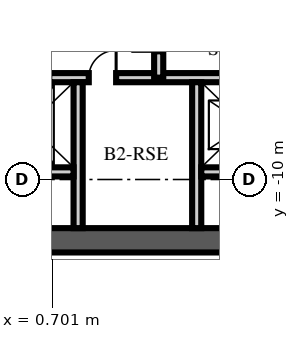
"""IFC4 building model, lengths in metres.
Left out: names, types, materials, properties, quantities, classifications, styles, units other than length and angle.
Written with IfcOpenShell. Run it as: python <this file> out.ifc"""

import sys

from ifc_helpers import new_model, si_unit, direction, frame, frame_2d, origin, place, context, subcontext, project, spatial, rectangle, extrude, element, fill, save


model = new_model("IFC4")
c1 = context("Model", 3, precision=1e-05, world=origin(), true_north=direction((0.0, 1.0)))
c2 = subcontext(c1, "Body", "Model", "MODEL_VIEW")
j1 = project(units=[si_unit("LENGTHUNIT", "METRE"), si_unit("PLANEANGLEUNIT", "RADIAN")], contexts=[c1])
p1 = place(None, origin())
s1 = spatial("IfcSite", under=j1, at=p1, CompositionType="ELEMENT")
p2 = place(p1, origin())
s2 = spatial("IfcBuilding", under=s1, at=p2, CompositionType="ELEMENT")
p3 = place(p2, frame((0.0, 0.0, -9.0)))
s3 = spatial("IfcBuildingStorey", under=s2, at=p3, CompositionType="ELEMENT", Elevation=-9.0)
p4 = place(p3, frame((-15.5, -12.0, -0.3), z_axis=(0.0, 0.0, 1.0), x_axis=(1.0, 0.0, 0.0)))
e1 = element("IfcWall", 1, at=p4, inside=s3, PredefinedType="SHEAR", context=c2, shape_type="SweptSolid", body=[
    extrude(rectangle(XDim=31.0, YDim=0.8, at=frame_2d((15.5, 0.0))), origin(), (0.0, 0.0, 1.0), 3.6),
])
p5 = place(p3, frame((-8.5, -6.65, 0.0), z_axis=(0.0, 0.0, 1.0), x_axis=(1.0, 0.0, 0.0)))
e2 = element("IfcWall", 2, at=p5, inside=s3, PredefinedType="PARTITIONING", context=c2, shape_type="SweptSolid", body=[
    extrude(rectangle(XDim=17.0, YDim=0.3, at=frame_2d((8.5, 0.0))), origin(), (0.0, 0.0, 1.0), 3.3),
])
p6 = place(p5, frame((7.8, 0.0, 0.0)))
e3 = element("IfcOpeningElement", 3, at=p6, cuts=e2, PredefinedType="OPENING", context=c2, shape_type="SweptSolid", body=[
    extrude(rectangle(XDim=1.3, YDim=2.4, at=frame_2d((0.65, 1.2))), frame((0.0, 0.16, 0.0), z_axis=(0.0, -1.0, 0.0), x_axis=(1.0, 0.0, 0.0)), (0.0, 0.0, 1.0), 0.32),
])
p7 = place(p5, frame((5.65, 0.0, 0.0)))
e4 = element("IfcOpeningElement", 4, at=p7, cuts=e2, PredefinedType="OPENING", context=c2, shape_type="SweptSolid", body=[
    extrude(rectangle(XDim=0.9, YDim=2.1, at=frame_2d((0.45, 1.05))), frame((0.0, 0.16, 0.0), z_axis=(0.0, -1.0, 0.0), x_axis=(1.0, 0.0, 0.0)), (0.0, 0.0, 1.0), 0.32),
])
p8 = place(p5, frame((10.4, 0.0, 0.0)))
e5 = element("IfcOpeningElement", 5, at=p8, cuts=e2, PredefinedType="OPENING", context=c2, shape_type="SweptSolid", body=[
    extrude(rectangle(XDim=0.9, YDim=2.1, at=frame_2d((0.45, 1.05))), frame((0.0, 0.16, 0.0), z_axis=(0.0, -1.0, 0.0), x_axis=(1.0, 0.0, 0.0)), (0.0, 0.0, 1.0), 0.32),
])
for number, where, z_axis, x_axis in (
    (6, (1.55, -11.6, 0.0), (0.0, 0.0, 1.0), (0.0, 1.0, 0.0)),
    (7, (5.45, -11.6, 0.0), (0.0, 0.0, 1.0), (0.0, 1.0, 0.0)),
):
    element("IfcWall", number, at=place(p3, frame(where, z_axis=z_axis, x_axis=x_axis)), inside=s3, PredefinedType="PARTITIONING", context=c2, shape_type="SweptSolid", body=[
        extrude(rectangle(XDim=4.8, YDim=0.3, at=frame_2d((2.4, 0.0))), origin(), (0.0, 0.0, 1.0), 3.3),
    ])
for number, where, z_axis, x_axis in (
    (8, (-1.5, -9.75, 0.0), (0.0, 0.0, 1.0), (1.0, 0.0, 0.0)),
    (9, (5.6, -9.75, 0.0), (0.0, 0.0, 1.0), (1.0, 0.0, 0.0)),
):
    element("IfcWall", number, at=place(p3, frame(where, z_axis=z_axis, x_axis=x_axis)), inside=s3, PredefinedType="PARTITIONING", context=c2, shape_type="SweptSolid", body=[
        extrude(rectangle(XDim=2.9, YDim=0.3, at=frame_2d((1.45, 0.0))), origin(), (0.0, 0.0, 1.0), 3.3),
    ])
p9 = place(p3, frame((4.2, -6.65, 0.0), z_axis=(0.0, 0.0, 1.0), x_axis=(0.0, 1.0, 0.0)))
e10 = element("IfcWall", 10, at=p9, inside=s3, PredefinedType="PARTITIONING", context=c2, shape_type="SweptSolid", body=[
    extrude(rectangle(XDim=7.45, YDim=0.3, at=frame_2d((3.725, 0.0))), origin(), (0.0, 0.0, 1.0), 3.3),
])
p10 = place(p9, frame((0.866, 0.0, 0.0)))
e11 = element("IfcOpeningElement", 11, at=p10, cuts=e10, PredefinedType="OPENING", context=c2, shape_type="SweptSolid", body=[
    extrude(rectangle(XDim=0.9, YDim=2.1, at=frame_2d((0.45, 1.05))), frame((0.0, 0.16, 0.0), z_axis=(0.0, -1.0, 0.0), x_axis=(1.0, 0.0, 0.0)), (0.0, 0.0, 1.0), 0.32),
])
p11 = place(p9, frame((4.591, 0.0, 0.0)))
e12 = element("IfcOpeningElement", 12, at=p11, cuts=e10, PredefinedType="OPENING", context=c2, shape_type="SweptSolid", body=[
    extrude(rectangle(XDim=0.9, YDim=2.1, at=frame_2d((0.45, 1.05))), frame((0.0, 0.16, 0.0), z_axis=(0.0, -1.0, 0.0), x_axis=(1.0, 0.0, 0.0)), (0.0, 0.0, 1.0), 0.32),
])
p12 = place(p8, origin())
e13 = element("IfcDoor", 13, at=p12, inside=s3, OperationType="SINGLE_SWING_RIGHT", PredefinedType="DOOR", context=c2, shape_type="SweptSolid", body=[
    extrude(rectangle(XDim=0.9, YDim=2.1, at=frame_2d((0.45, 1.05))), frame((0.0, 0.025, 0.0), z_axis=(0.0, -1.0, 0.0), x_axis=(1.0, 0.0, 0.0)), (0.0, 0.0, 1.0), 0.05),
])
fill(e5, e13)
save(model, sys.argv[1])
